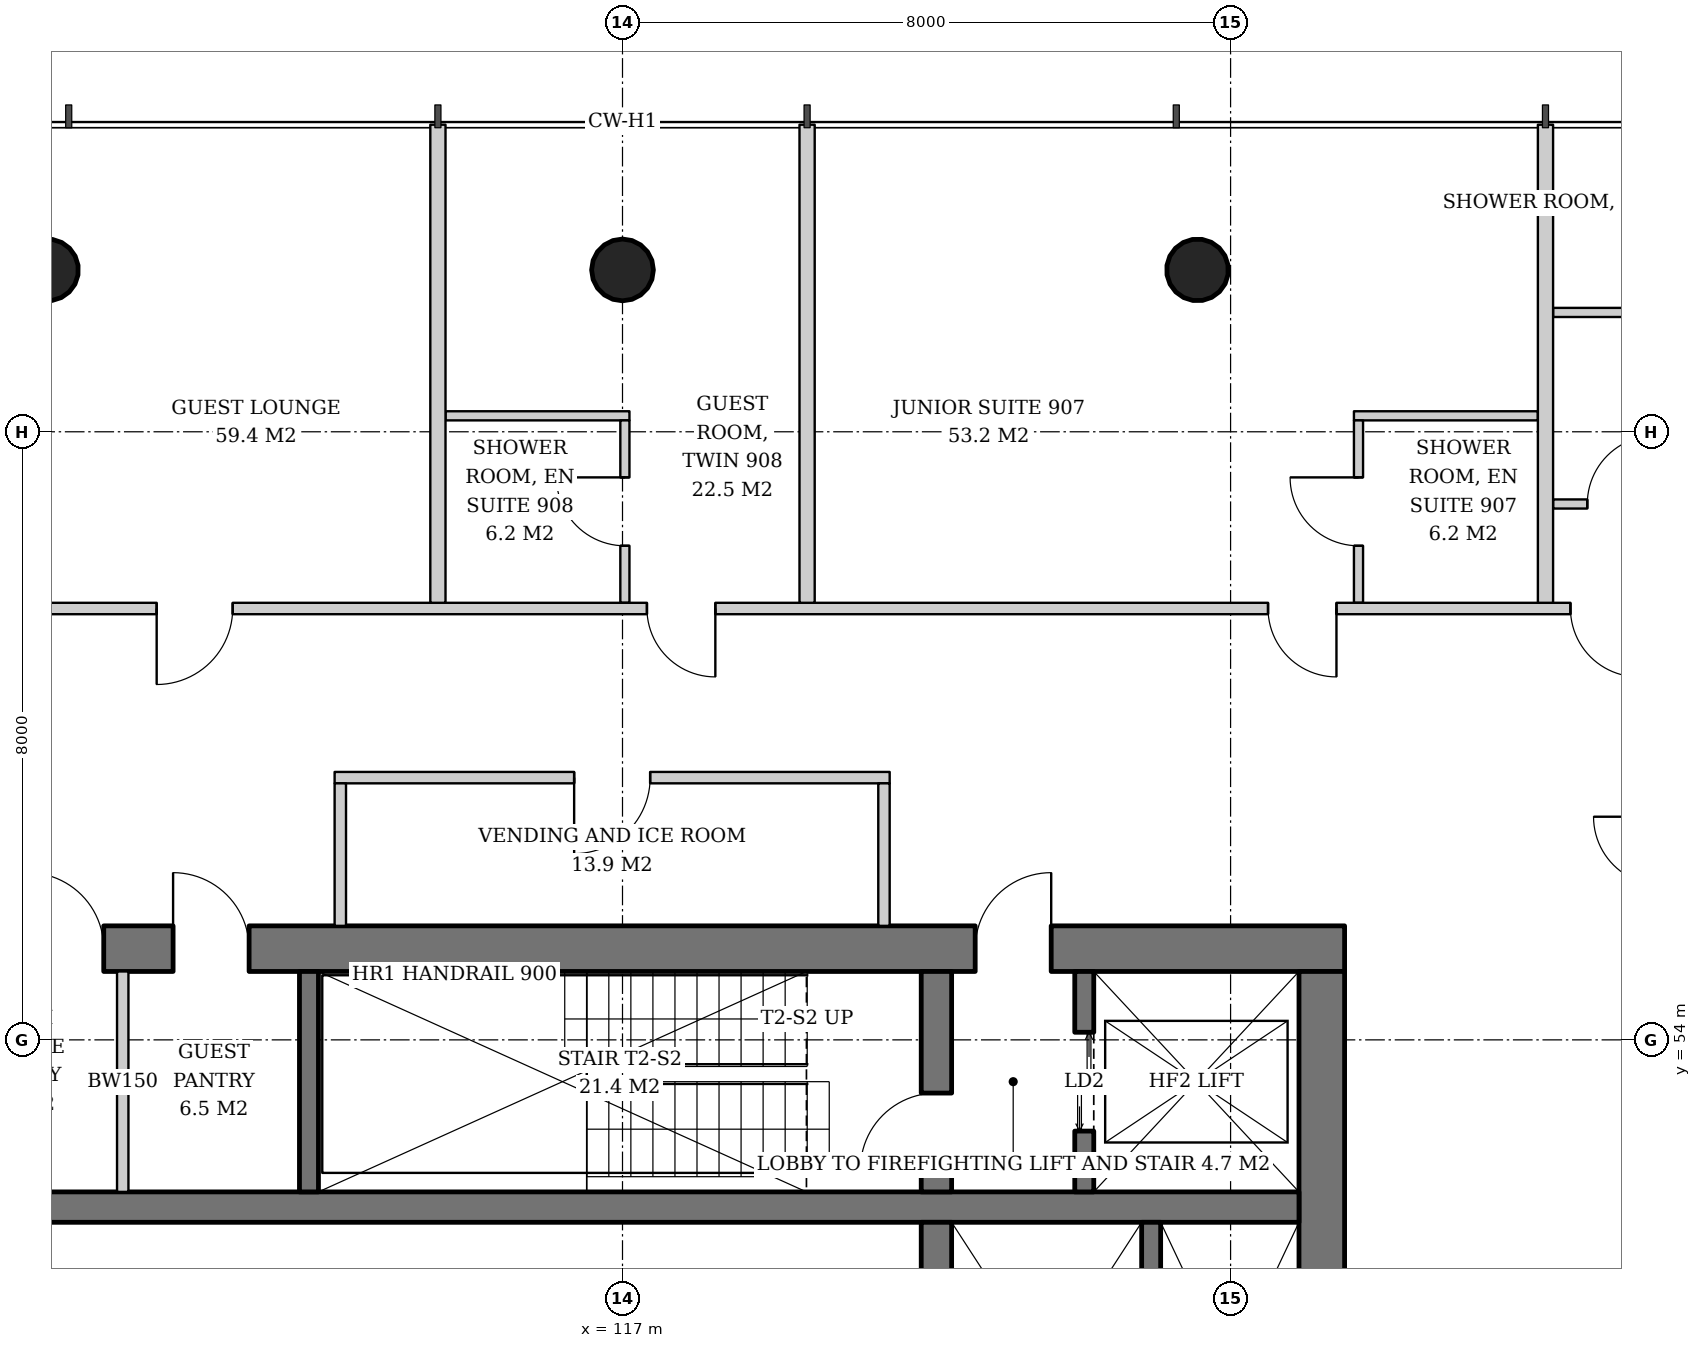
"""IFC4 building model, lengths in metres.
Left out: names, types, materials, properties, quantities, classifications, styles, units other than length and angle.
Written with IfcOpenShell. Run it as: python <this file> out.ifc"""

import sys

from ifc_helpers import new_model, si_unit, direction, frame, frame_2d, origin, origin_2d, place, context, subcontext, project, spatial, rectangle, hollow_circle, extrude, element, fill, save


model = new_model("IFC4")
c1 = context("Model", 3, precision=1e-05, world=origin(), true_north=direction((0.0, 1.0)))
c2 = subcontext(c1, "Body", "Model", "MODEL_VIEW")
j1 = project(units=[si_unit("LENGTHUNIT", "METRE"), si_unit("PLANEANGLEUNIT", "RADIAN")], contexts=[c1])
p1 = place(None, origin())
s1 = spatial("IfcSite", under=j1, at=p1, CompositionType="ELEMENT")
p2 = place(p1, origin())
s2 = spatial("IfcBuilding", under=s1, at=p2, CompositionType="ELEMENT")
p3 = place(p2, frame((0.0, 0.0, 40.0)))
s3 = spatial("IfcBuildingStorey", under=s2, at=p3, CompositionType="ELEMENT", Elevation=40.0)
p4 = place(p3, frame((124.591, 64.181, 0.0), z_axis=(-0.021561848751, -0.043059525333, 0.998839808957), x_axis=(0.894160516368, -0.44774654769, 0.0)))
e1 = element("IfcColumn", 1, at=p4, inside=s3, PredefinedType="COLUMN", context=c2, shape_type="SweptSolid", body=[
    extrude(hollow_circle(Radius=0.406, WallThickness=0.03, at=origin_2d()), origin(), (0.0, 0.0, 1.0), 3.804),
])
p5 = place(p3, frame((117.0, 64.181, 0.0), z_axis=(0.0, -0.043069538298, 0.999072076915), x_axis=(1.0, 0.0, 0.0)))
e2 = element("IfcColumn", 2, at=p5, inside=s3, PredefinedType="COLUMN", context=c2, shape_type="SweptSolid", body=[
    extrude(hollow_circle(Radius=0.406, WallThickness=0.03, at=origin_2d()), origin(), (0.0, 0.0, 1.0), 3.803),
])
p6 = place(p3, frame((109.409, 64.181, 0.0), z_axis=(0.021561848751, -0.043059525333, 0.998839808957), x_axis=(0.894160516368, 0.44774654769, 0.0)))
e3 = element("IfcColumn", 3, at=p6, inside=s3, PredefinedType="COLUMN", context=c2, shape_type="SweptSolid", body=[
    extrude(hollow_circle(Radius=0.406, WallThickness=0.03, at=origin_2d()), origin(), (0.0, 0.0, 1.0), 3.804),
])
p7 = place(p3, frame((107.5, 55.2, 0.0), z_axis=(0.0, 0.0, 1.0), x_axis=(1.0, 0.0, 0.0)))
e4 = element("IfcWall", 4, at=p7, inside=s3, PredefinedType="SHEAR", context=c2, shape_type="SweptSolid", body=[
    extrude(rectangle(XDim=19.0, YDim=0.6, at=frame_2d((9.5, 0.0))), origin(), (0.0, 0.0, 1.0), 3.8),
])
p8 = place(p7, frame((14.14, 0.0, 0.0)))
e5 = element("IfcOpeningElement", 5, at=p8, cuts=e4, PredefinedType="OPENING", context=c2, shape_type="SweptSolid", body=[
    extrude(rectangle(XDim=1.0, YDim=2.1, at=frame_2d((0.5, 1.05))), frame((0.0, 0.31, 0.0), z_axis=(0.0, -1.0, 0.0), x_axis=(1.0, 0.0, 0.0)), (0.0, 0.0, 1.0), 0.62),
])
p9 = place(p7, frame((1.675, 0.0, 0.0)))
e6 = element("IfcOpeningElement", 6, at=p9, cuts=e4, PredefinedType="OPENING", context=c2, shape_type="SweptSolid", body=[
    extrude(rectangle(XDim=1.0, YDim=2.1, at=frame_2d((0.5, 1.05))), frame((0.0, 0.31, 0.0), z_axis=(0.0, -1.0, 0.0), x_axis=(1.0, 0.0, 0.0)), (0.0, 0.0, 1.0), 0.62),
])
p10 = place(p7, frame((3.587, 0.0, 0.0)))
e7 = element("IfcOpeningElement", 7, at=p10, cuts=e4, PredefinedType="OPENING", context=c2, shape_type="SweptSolid", body=[
    extrude(rectangle(XDim=1.0, YDim=2.1, at=frame_2d((0.5, 1.05))), frame((0.0, 0.31, 0.0), z_axis=(0.0, -1.0, 0.0), x_axis=(1.0, 0.0, 0.0)), (0.0, 0.0, 1.0), 0.62),
])
p11 = place(p3, frame((126.2, 37.1, 0.0), z_axis=(0.0, 0.0, 1.0), x_axis=(0.0, 1.0, 0.0)))
e8 = element("IfcWall", 8, at=p11, inside=s3, PredefinedType="SHEAR", context=c2, shape_type="SweptSolid", body=[
    extrude(rectangle(XDim=17.8, YDim=0.6, at=frame_2d((8.9, 0.0))), origin(), (0.0, 0.0, 1.0), 3.8),
])
p12 = place(p11, frame((8.0, 0.0, 0.0)))
e9 = element("IfcOpeningElement", 9, at=p12, cuts=e8, PredefinedType="OPENING", context=c2, shape_type="SweptSolid", body=[
    extrude(rectangle(XDim=1.8, YDim=2.4, at=frame_2d((0.9, 1.2))), frame((0.0, 0.31, 0.0), z_axis=(0.0, -1.0, 0.0), x_axis=(1.0, 0.0, 0.0)), (0.0, 0.0, 1.0), 0.62),
])
p13 = place(p3, frame((108.1, 51.8, 0.0), z_axis=(0.0, 0.0, 1.0), x_axis=(1.0, 0.0, 0.0)))
e10 = element("IfcWall", 10, at=p13, inside=s3, PredefinedType="SHEAR", context=c2, shape_type="SweptSolid", body=[
    extrude(rectangle(XDim=17.8, YDim=0.4, at=frame_2d((8.9, 0.0))), origin(), (0.0, 0.0, 1.0), 3.8),
])
p14 = place(p3, frame((121.13, 40.4, 0.0), z_axis=(0.0, 0.0, 1.0), x_axis=(0.0, 1.0, 0.0)))
e11 = element("IfcWall", 11, at=p14, inside=s3, PredefinedType="SHEAR", context=c2, shape_type="SweptSolid", body=[
    extrude(rectangle(XDim=11.2, YDim=0.4, at=frame_2d((5.6, 0.0))), origin(), (0.0, 0.0, 1.0), 3.8),
])
p15 = place(p3, frame((121.13, 52.0, 0.0), z_axis=(0.0, 0.0, 1.0), x_axis=(0.0, 1.0, 0.0)))
e12 = element("IfcWall", 12, at=p15, inside=s3, PredefinedType="SHEAR", context=c2, shape_type="SweptSolid", body=[
    extrude(rectangle(XDim=2.9, YDim=0.4, at=frame_2d((1.45, 0.0))), origin(), (0.0, 0.0, 1.0), 3.8),
])
p16 = place(p15, frame((0.3, 0.0, 0.0)))
e13 = element("IfcOpeningElement", 13, at=p16, cuts=e12, PredefinedType="OPENING", context=c2, shape_type="SweptSolid", body=[
    extrude(rectangle(XDim=1.0, YDim=2.1, at=frame_2d((0.5, 1.05))), frame((0.0, 0.21, 0.0), z_axis=(0.0, -1.0, 0.0), x_axis=(1.0, 0.0, 0.0)), (0.0, 0.0, 1.0), 0.42),
])
p17 = place(p3, frame((112.875, 52.0, 0.0), z_axis=(0.0, 0.0, 1.0), x_axis=(0.0, 1.0, 0.0)))
e14 = element("IfcWall", 14, at=p17, inside=s3, PredefinedType="SHEAR", context=c2, shape_type="SweptSolid", body=[
    extrude(rectangle(XDim=2.9, YDim=0.25, at=frame_2d((1.45, 0.0))), origin(), (0.0, 0.0, 1.0), 3.8),
])
p18 = place(p3, frame((123.075, 52.0, 0.0), z_axis=(0.0, 0.0, 1.0), x_axis=(0.0, 1.0, 0.0)))
e15 = element("IfcWall", 15, at=p18, inside=s3, PredefinedType="SHEAR", context=c2, shape_type="SweptSolid", body=[
    extrude(rectangle(XDim=2.9, YDim=0.25, at=frame_2d((1.45, 0.0))), origin(), (0.0, 0.0, 1.0), 3.8),
])
p19 = place(p18, frame((0.8, 0.0, 0.0)))
e16 = element("IfcOpeningElement", 16, at=p19, cuts=e15, PredefinedType="OPENING", context=c2, shape_type="SweptSolid", body=[
    extrude(rectangle(XDim=1.3, YDim=2.2, at=frame_2d((0.65, 1.1))), frame((0.0, 0.135, 0.0), z_axis=(0.0, -1.0, 0.0), x_axis=(1.0, 0.0, 0.0)), (0.0, 0.0, 1.0), 0.27),
])
p20 = place(p3, frame((123.955, 47.75, 0.0), z_axis=(0.0, 0.0, 1.0), x_axis=(0.0, 1.0, 0.0)))
e17 = element("IfcWall", 17, at=p20, inside=s3, PredefinedType="SHEAR", context=c2, shape_type="SweptSolid", body=[
    extrude(rectangle(XDim=3.85, YDim=0.25, at=frame_2d((1.925, 0.0))), origin(), (0.0, 0.0, 1.0), 3.8),
])
p21 = place(p3, frame((110.425, 52.0, 0.0), z_axis=(0.0, 0.0, 1.0), x_axis=(0.0, 1.0, 0.0)))
e18 = element("IfcWall", 18, at=p21, inside=s3, PredefinedType="SOLIDWALL", context=c2, shape_type="SweptSolid", body=[
    extrude(rectangle(XDim=2.9, YDim=0.15, at=frame_2d((1.45, 0.0))), origin(), (0.0, 0.0, 1.0), 3.6),
])
p22 = place(p3, frame((120.515, 57.45, 0.0), z_axis=(0.0, 0.0, 1.0), x_axis=(-1.0, 0.0, 0.0)))
e19 = element("IfcWall", 19, at=p22, inside=s3, PredefinedType="PARTITIONING", context=c2, shape_type="SweptSolid", body=[
    extrude(rectangle(XDim=7.302, YDim=0.15, at=frame_2d((3.651, 0.0))), origin(), (0.0, 0.0, 1.0), 2.847),
])
p23 = place(p22, frame((3.151, 0.0, 0.0)))
e20 = element("IfcOpeningElement", 20, at=p23, cuts=e19, PredefinedType="OPENING", context=c2, shape_type="SweptSolid", body=[
    extrude(rectangle(XDim=1.0, YDim=2.1, at=frame_2d((0.5, 1.05))), frame((0.0, 0.085, 0.0), z_axis=(0.0, -1.0, 0.0), x_axis=(1.0, 0.0, 0.0)), (0.0, 0.0, 1.0), 0.17),
])
for number, where, z_axis, x_axis in (
    (21, (120.44, 55.5, 0.0), (0.0, 0.0, 1.0), (0.0, 1.0, 0.0)),
    (22, (113.288, 55.5, 0.0), (0.0, 0.0, 1.0), (0.0, 1.0, 0.0)),
):
    element("IfcWall", number, at=place(p3, frame(where, z_axis=z_axis, x_axis=x_axis)), inside=s3, PredefinedType="PARTITIONING", context=c2, shape_type="SweptSolid", body=[
        extrude(rectangle(XDim=1.875, YDim=0.15, at=frame_2d((0.938, 0.0))), origin(), (0.0, 0.0, 1.0), 3.6),
    ])
p24 = place(p3, frame((129.243, 61.05, 0.0), z_axis=(0.0, 0.0, 1.0), x_axis=(1.0, 0.0, 0.0)))
e23 = element("IfcWall", 23, at=p24, inside=s3, PredefinedType="PARTITIONING", context=c2, shape_type="SweptSolid", body=[
    extrude(rectangle(XDim=1.757, YDim=0.12, at=frame_2d((0.878, 0.0))), origin(), (0.0, 0.0, 1.0), 3.6),
])
p25 = place(p24, frame((0.45, 0.0, 0.0)))
e24 = element("IfcOpeningElement", 24, at=p25, cuts=e23, PredefinedType="OPENING", context=c2, shape_type="SweptSolid", body=[
    extrude(rectangle(XDim=0.9, YDim=2.1, at=frame_2d((0.45, 1.05))), frame((0.0, 0.07, 0.0), z_axis=(0.0, -1.0, 0.0), x_axis=(1.0, 0.0, 0.0)), (0.0, 0.0, 1.0), 0.14),
])
p26 = place(p3, frame((129.243, 63.57, 0.0), z_axis=(0.0, 0.0, 1.0), x_axis=(1.0, 0.0, 0.0)))
e25 = element("IfcWall", 25, at=p26, inside=s3, PredefinedType="PARTITIONING", context=c2, shape_type="SweptSolid", body=[
    extrude(rectangle(XDim=2.368, YDim=0.12, at=frame_2d((1.184, 0.0))), origin(), (0.0, 0.0, 1.0), 3.6),
])
p27 = place(p3, frame((129.043, 62.21, 0.0), z_axis=(0.0, 0.0, 1.0), x_axis=(-1.0, 0.0, 0.0)))
e26 = element("IfcWall", 26, at=p27, inside=s3, PredefinedType="PARTITIONING", context=c2, shape_type="SweptSolid", body=[
    extrude(rectangle(XDim=2.42, YDim=0.12, at=frame_2d((1.21, 0.0))), origin(), (0.0, 0.0, 1.0), 3.6),
])
p28 = place(p3, frame((126.683, 59.75, 0.0), z_axis=(0.0, 0.0, 1.0), x_axis=(0.0, 1.0, 0.0)))
e27 = element("IfcWall", 27, at=p28, inside=s3, PredefinedType="PARTITIONING", context=c2, shape_type="SweptSolid", body=[
    extrude(rectangle(XDim=2.4, YDim=0.12, at=frame_2d((1.2, 0.0))), origin(), (0.0, 0.0, 1.0), 3.6),
])
p29 = place(p28, frame((0.75, 0.0, 0.0)))
e28 = element("IfcOpeningElement", 28, at=p29, cuts=e27, PredefinedType="OPENING", context=c2, shape_type="SweptSolid", body=[
    extrude(rectangle(XDim=0.9, YDim=2.1, at=frame_2d((0.45, 1.05))), frame((0.0, 0.07, 0.0), z_axis=(0.0, -1.0, 0.0), x_axis=(1.0, 0.0, 0.0)), (0.0, 0.0, 1.0), 0.14),
])
p30 = place(p3, frame((117.091, 62.21, 0.0), z_axis=(0.0, 0.0, 1.0), x_axis=(-1.0, 0.0, 0.0)))
e29 = element("IfcWall", 29, at=p30, inside=s3, PredefinedType="PARTITIONING", context=c2, shape_type="SweptSolid", body=[
    extrude(rectangle(XDim=2.42, YDim=0.12, at=frame_2d((1.21, 0.0))), origin(), (0.0, 0.0, 1.0), 2.847),
])
p31 = place(p3, frame((117.031, 59.75, 0.0), z_axis=(0.0, 0.0, 1.0), x_axis=(0.0, 1.0, 0.0)))
e30 = element("IfcWall", 30, at=p31, inside=s3, PredefinedType="PARTITIONING", context=c2, shape_type="SweptSolid", body=[
    extrude(rectangle(XDim=2.4, YDim=0.12, at=frame_2d((1.2, 0.0))), origin(), (0.0, 0.0, 1.0), 2.847),
])
p32 = place(p31, frame((0.75, 0.0, 0.0)))
e31 = element("IfcOpeningElement", 31, at=p32, cuts=e30, PredefinedType="OPENING", context=c2, shape_type="SweptSolid", body=[
    extrude(rectangle(XDim=0.9, YDim=2.1, at=frame_2d((0.45, 1.05))), frame((0.0, 0.07, 0.0), z_axis=(0.0, -1.0, 0.0), x_axis=(1.0, 0.0, 0.0)), (0.0, 0.0, 1.0), 0.14),
])
p33 = place(p3, frame((131.294, 59.675, 0.0), z_axis=(0.0, 0.0, 1.0), x_axis=(-1.0, 0.0, 0.0)))
e32 = element("IfcWall", 32, at=p33, inside=s3, PredefinedType="PARTITIONING", context=c2, shape_type="SweptSolid", body=[
    extrude(rectangle(XDim=28.589, YDim=0.15, at=frame_2d((14.294, 0.0))), origin(), (0.0, 0.0, 1.0), 2.8),
])
p34 = place(p33, frame((0.923, 0.0, 0.0)))
e33 = element("IfcOpeningElement", 33, at=p34, cuts=e32, PredefinedType="OPENING", context=c2, shape_type="SweptSolid", body=[
    extrude(rectangle(XDim=0.9, YDim=2.1, at=frame_2d((0.45, 1.05))), frame((0.0, 0.085, 0.0), z_axis=(0.0, -1.0, 0.0), x_axis=(1.0, 0.0, 0.0)), (0.0, 0.0, 1.0), 0.17),
])
p35 = place(p33, frame((4.902, 0.0, 0.0)))
e34 = element("IfcOpeningElement", 34, at=p35, cuts=e32, PredefinedType="OPENING", context=c2, shape_type="SweptSolid", body=[
    extrude(rectangle(XDim=0.9, YDim=2.1, at=frame_2d((0.45, 1.05))), frame((0.0, 0.085, 0.0), z_axis=(0.0, -1.0, 0.0), x_axis=(1.0, 0.0, 0.0)), (0.0, 0.0, 1.0), 0.17),
])
p36 = place(p33, frame((13.073, 0.0, 0.0)))
e35 = element("IfcOpeningElement", 35, at=p36, cuts=e32, PredefinedType="OPENING", context=c2, shape_type="SweptSolid", body=[
    extrude(rectangle(XDim=0.9, YDim=2.1, at=frame_2d((0.45, 1.05))), frame((0.0, 0.085, 0.0), z_axis=(0.0, -1.0, 0.0), x_axis=(1.0, 0.0, 0.0)), (0.0, 0.0, 1.0), 0.17),
])
p37 = place(p33, frame((19.423, 0.0, 0.0)))
e36 = element("IfcOpeningElement", 36, at=p37, cuts=e32, PredefinedType="OPENING", context=c2, shape_type="SweptSolid", body=[
    extrude(rectangle(XDim=1.0, YDim=2.1, at=frame_2d((0.5, 1.05))), frame((0.0, 0.085, 0.0), z_axis=(0.0, -1.0, 0.0), x_axis=(1.0, 0.0, 0.0)), (0.0, 0.0, 1.0), 0.17),
])
for number, where, z_axis, x_axis in (
    (37, (129.143, 59.75, 0.0), (0.0, 0.0, 1.0), (0.0, 1.0, 0.0)),
    (38, (119.428, 59.75, 0.0), (0.0, 0.0, 1.0), (0.0, 1.0, 0.0)),
    (39, (114.572, 59.75, 0.0), (0.0, 0.0, 1.0), (0.0, 1.0, 0.0)),
):
    element("IfcWall", number, at=place(p3, frame(where, z_axis=z_axis, x_axis=x_axis)), inside=s3, PredefinedType="PARTITIONING", context=c2, shape_type="SweptSolid", body=[
        extrude(rectangle(XDim=6.29, YDim=0.2, at=frame_2d((3.145, 0.0))), origin(), (0.0, 0.0, 1.0), 3.05),
    ])
p38 = place(p19, origin())
e40 = element("IfcDoor", 40, at=p38, inside=s3, OperationType="DOUBLE_DOOR_SLIDING", PredefinedType="DOOR", context=c2, shape_type="SweptSolid", body=[
    extrude(rectangle(XDim=1.3, YDim=2.2, at=frame_2d((0.65, 1.1))), frame((0.0, 0.025, 0.0), z_axis=(0.0, -1.0, 0.0), x_axis=(1.0, 0.0, 0.0)), (0.0, 0.0, 1.0), 0.05),
])
fill(e16, e40)
p39 = place(p16, origin())
e41 = element("IfcDoor", 41, at=p39, inside=s3, OperationType="SINGLE_SWING_LEFT", PredefinedType="DOOR", context=c2, shape_type="SweptSolid", body=[
    extrude(rectangle(XDim=1.0, YDim=2.1, at=frame_2d((0.5, 1.05))), frame((0.0, 0.025, 0.0), z_axis=(0.0, -1.0, 0.0), x_axis=(1.0, 0.0, 0.0)), (0.0, 0.0, 1.0), 0.05),
])
fill(e13, e41)
p40 = place(p8, origin())
e42 = element("IfcDoor", 42, at=p40, inside=s3, OperationType="SINGLE_SWING_RIGHT", PredefinedType="DOOR", context=c2, shape_type="SweptSolid", body=[
    extrude(rectangle(XDim=1.0, YDim=2.1, at=frame_2d((0.5, 1.05))), frame((0.0, 0.025, 0.0), z_axis=(0.0, -1.0, 0.0), x_axis=(1.0, 0.0, 0.0)), (0.0, 0.0, 1.0), 0.05),
])
fill(e5, e42)
p41 = place(p9, origin())
e43 = element("IfcDoor", 43, at=p41, inside=s3, OperationType="SINGLE_SWING_LEFT", PredefinedType="DOOR", context=c2, shape_type="SweptSolid", body=[
    extrude(rectangle(XDim=1.0, YDim=2.1, at=frame_2d((0.5, 1.05))), frame((0.0, -0.24, 0.0), z_axis=(0.0, -1.0, 0.0), x_axis=(1.0, 0.0, 0.0)), (0.0, 0.0, 1.0), 0.05),
])
fill(e6, e43)
p42 = place(p10, origin())
e44 = element("IfcDoor", 44, at=p42, inside=s3, OperationType="SINGLE_SWING_LEFT", PredefinedType="DOOR", context=c2, shape_type="SweptSolid", body=[
    extrude(rectangle(XDim=1.0, YDim=2.1, at=frame_2d((0.5, 1.05))), frame((0.0, -0.24, 0.0), z_axis=(0.0, -1.0, 0.0), x_axis=(1.0, 0.0, 0.0)), (0.0, 0.0, 1.0), 0.05),
])
fill(e7, e44)
p43 = place(p23, origin())
e45 = element("IfcDoor", 45, at=p43, inside=s3, OperationType="SINGLE_SWING_RIGHT", PredefinedType="DOOR", context=c2, shape_type="SweptSolid", body=[
    extrude(rectangle(XDim=1.0, YDim=2.1, at=frame_2d((0.5, 1.05))), frame((0.0, 0.025, 0.0), z_axis=(0.0, -1.0, 0.0), x_axis=(1.0, 0.0, 0.0)), (0.0, 0.0, 1.0), 0.05),
])
fill(e20, e45)
p44 = place(p25, origin())
e46 = element("IfcDoor", 46, at=p44, inside=s3, OperationType="SINGLE_SWING_RIGHT", PredefinedType="DOOR", context=c2, shape_type="SweptSolid", body=[
    extrude(rectangle(XDim=0.9, YDim=2.1, at=frame_2d((0.45, 1.05))), frame((0.0, 0.025, 0.0), z_axis=(0.0, -1.0, 0.0), x_axis=(1.0, 0.0, 0.0)), (0.0, 0.0, 1.0), 0.05),
])
fill(e24, e46)
p45 = place(p29, origin())
e47 = element("IfcDoor", 47, at=p45, inside=s3, OperationType="SINGLE_SWING_RIGHT", PredefinedType="DOOR", context=c2, shape_type="SweptSolid", body=[
    extrude(rectangle(XDim=0.9, YDim=2.1, at=frame_2d((0.45, 1.05))), frame((0.0, 0.025, 0.0), z_axis=(0.0, -1.0, 0.0), x_axis=(1.0, 0.0, 0.0)), (0.0, 0.0, 1.0), 0.05),
])
fill(e28, e47)
p46 = place(p32, origin())
e48 = element("IfcDoor", 48, at=p46, inside=s3, OperationType="SINGLE_SWING_RIGHT", PredefinedType="DOOR", context=c2, shape_type="SweptSolid", body=[
    extrude(rectangle(XDim=0.9, YDim=2.1, at=frame_2d((0.45, 1.05))), frame((0.0, 0.025, 0.0), z_axis=(0.0, -1.0, 0.0), x_axis=(1.0, 0.0, 0.0)), (0.0, 0.0, 1.0), 0.05),
])
fill(e31, e48)
p47 = place(p34, origin())
e49 = element("IfcDoor", 49, at=p47, inside=s3, OperationType="SINGLE_SWING_LEFT", PredefinedType="DOOR", context=c2, shape_type="SweptSolid", body=[
    extrude(rectangle(XDim=0.9, YDim=2.1, at=frame_2d((0.45, 1.05))), frame((0.0, 0.025, 0.0), z_axis=(0.0, -1.0, 0.0), x_axis=(1.0, 0.0, 0.0)), (0.0, 0.0, 1.0), 0.05),
])
fill(e33, e49)
p48 = place(p35, origin())
e50 = element("IfcDoor", 50, at=p48, inside=s3, OperationType="SINGLE_SWING_LEFT", PredefinedType="DOOR", context=c2, shape_type="SweptSolid", body=[
    extrude(rectangle(XDim=0.9, YDim=2.1, at=frame_2d((0.45, 1.05))), frame((0.0, 0.025, 0.0), z_axis=(0.0, -1.0, 0.0), x_axis=(1.0, 0.0, 0.0)), (0.0, 0.0, 1.0), 0.05),
])
fill(e34, e50)
p49 = place(p36, origin())
e51 = element("IfcDoor", 51, at=p49, inside=s3, OperationType="SINGLE_SWING_LEFT", PredefinedType="DOOR", context=c2, shape_type="SweptSolid", body=[
    extrude(rectangle(XDim=0.9, YDim=2.1, at=frame_2d((0.45, 1.05))), frame((0.0, 0.025, 0.0), z_axis=(0.0, -1.0, 0.0), x_axis=(1.0, 0.0, 0.0)), (0.0, 0.0, 1.0), 0.05),
])
fill(e35, e51)
p50 = place(p37, origin())
e52 = element("IfcDoor", 52, at=p50, inside=s3, OperationType="SINGLE_SWING_RIGHT", PredefinedType="DOOR", context=c2, shape_type="SweptSolid", body=[
    extrude(rectangle(XDim=1.0, YDim=2.1, at=frame_2d((0.5, 1.05))), frame((0.0, 0.025, 0.0), z_axis=(0.0, -1.0, 0.0), x_axis=(1.0, 0.0, 0.0)), (0.0, 0.0, 1.0), 0.05),
])
fill(e36, e52)
save(model, sys.argv[1])
